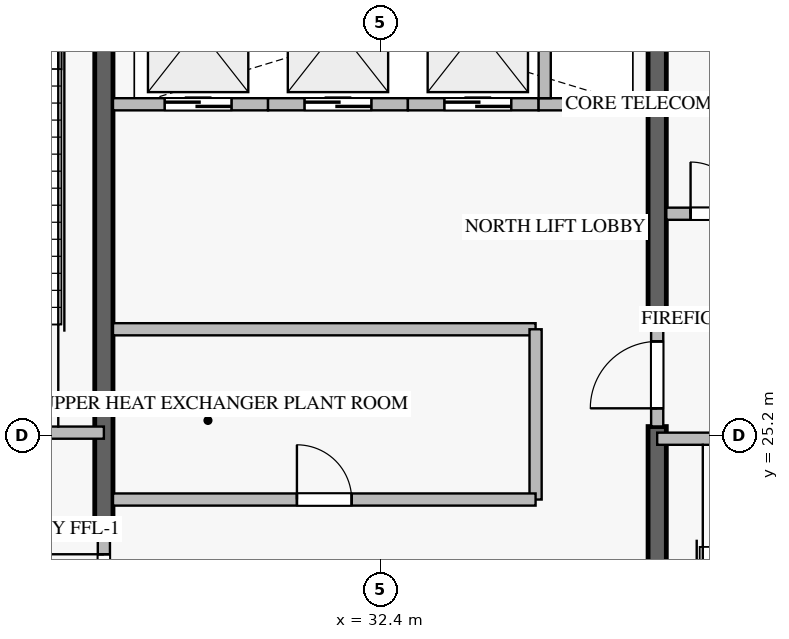
"""IFC4 building model, lengths in metres.
Left out: names, types, materials, properties, quantities, classifications, styles, units other than length and angle.
Written with IfcOpenShell. Run it as: python <this file> out.ifc"""

import sys

from ifc_helpers import new_model, si_unit, direction, frame, frame_2d, origin, place, context, subcontext, project, spatial, rectangle, extrude, source, transform, mapped, element, fill, save


model = new_model("IFC4")
c1 = context("Model", 3, precision=1e-05, world=origin(), true_north=direction((0.0, 1.0)))
c2 = subcontext(c1, "Body", "Model", "MODEL_VIEW")
j1 = project(units=[si_unit("LENGTHUNIT", "METRE"), si_unit("PLANEANGLEUNIT", "RADIAN")], contexts=[c1])
p1 = place(None, origin())
s1 = spatial("IfcSite", under=j1, at=p1, CompositionType="ELEMENT")
p2 = place(p1, origin())
s2 = spatial("IfcBuilding", under=s1, at=p2, CompositionType="ELEMENT")
p3 = place(p2, frame((0.0, 0.0, 287.45)))
s3 = spatial("IfcBuildingStorey", under=s2, at=p3, CompositionType="ELEMENT", Elevation=287.45)
p4 = place(p3, frame((27.85, 23.55, -0.44), z_axis=(0.0, 0.0, 1.0), x_axis=(0.0, 1.0, 0.0)))
e1 = element("IfcWall", 1, at=p4, inside=s3, PredefinedType="SHEAR", context=c2, shape_type="SweptSolid", body=[
    extrude(rectangle(XDim=9.875, YDim=0.3, at=frame_2d((4.938, 0.0))), origin(), (0.0, 0.0, 1.0), 6.178),
])
p5 = place(p3, frame((36.95, 16.975, -0.44), z_axis=(0.0, 0.0, 1.0), x_axis=(0.0, 1.0, 0.0)))
e2 = element("IfcWall", 2, at=p5, inside=s3, PredefinedType="SHEAR", context=c2, shape_type="SweptSolid", body=[
    extrude(rectangle(XDim=8.375, YDim=0.3, at=frame_2d((4.188, 0.0))), origin(), (0.0, 0.0, 1.0), 6.178),
])
p6 = place(p3, frame((36.95, 27.05, -0.44), z_axis=(0.0, 0.0, 1.0), x_axis=(0.0, 1.0, 0.0)))
e3 = element("IfcWall", 3, at=p6, inside=s3, PredefinedType="SHEAR", context=c2, shape_type="SweptSolid", body=[
    extrude(rectangle(XDim=6.375, YDim=0.3, at=frame_2d((3.188, 0.0))), origin(), (0.0, 0.0, 1.0), 6.178),
])
p7 = place(p3, frame((23.4, 25.25, 0.0), z_axis=(0.0, 0.0, 1.0), x_axis=(1.0, 0.0, 0.0)))
e4 = element("IfcWall", 4, at=p7, inside=s3, PredefinedType="STANDARD", context=c2, shape_type="SweptSolid", body=[
    extrude(rectangle(XDim=4.45, YDim=0.2, at=frame_2d((2.225, 0.0))), origin(), (0.0, 0.0, 1.0), 5.74),
])
p8 = place(p7, frame((1.65, 0.0, 0.0)))
e5 = element("IfcOpeningElement", 5, at=p8, cuts=e4, PredefinedType="OPENING", context=c2, shape_type="SweptSolid", body=[
    extrude(rectangle(XDim=1.1, YDim=2.15, at=frame_2d((0.55, 1.075))), frame((0.0, 0.11, 0.0), z_axis=(0.0, -1.0, 0.0), x_axis=(1.0, 0.0, 0.0)), (0.0, 0.0, 1.0), 0.22),
])
p9 = place(p3, frame((36.95, 25.15, 0.0), z_axis=(0.0, 0.0, 1.0), x_axis=(1.0, 0.0, 0.0)))
e6 = element("IfcWall", 6, at=p9, inside=s3, PredefinedType="STANDARD", context=c2, shape_type="SweptSolid", body=[
    extrude(rectangle(XDim=4.45, YDim=0.2, at=frame_2d((2.225, 0.0))), origin(), (0.0, 0.0, 1.0), 5.74),
])
p10 = place(p9, frame((1.65, 0.0, 0.0)))
e7 = element("IfcOpeningElement", 7, at=p10, cuts=e6, PredefinedType="OPENING", context=c2, shape_type="SweptSolid", body=[
    extrude(rectangle(XDim=1.1, YDim=2.15, at=frame_2d((0.55, 1.075))), frame((0.0, 0.11, 0.0), z_axis=(0.0, -1.0, 0.0), x_axis=(1.0, 0.0, 0.0)), (0.0, 0.0, 1.0), 0.22),
])
p11 = place(p3, frame((28.0, 30.65, 0.0), z_axis=(0.0, 0.0, 1.0), x_axis=(1.0, 0.0, 0.0)))
e8 = element("IfcWall", 8, at=p11, inside=s3, PredefinedType="STANDARD", context=c2, shape_type="SweptSolid", body=[
    extrude(rectangle(XDim=2.55, YDim=0.2, at=frame_2d((1.275, 0.0))), origin(), (0.0, 0.0, 1.0), 5.74),
])
p12 = place(p11, frame((0.85, 0.0, 0.0)))
e9 = element("IfcOpeningElement", 9, at=p12, cuts=e8, PredefinedType="OPENING", context=c2, shape_type="SweptSolid", body=[
    extrude(rectangle(XDim=1.1, YDim=2.2, at=frame_2d((0.55, 1.1))), frame((0.0, 0.11, 0.0), z_axis=(0.0, -1.0, 0.0), x_axis=(1.0, 0.0, 0.0)), (0.0, 0.0, 1.0), 0.22),
])
p13 = place(p3, frame((30.55, 30.65, 0.0), z_axis=(0.0, 0.0, 1.0), x_axis=(1.0, 0.0, 0.0)))
e10 = element("IfcWall", 10, at=p13, inside=s3, PredefinedType="STANDARD", context=c2, shape_type="SweptSolid", body=[
    extrude(rectangle(XDim=2.3, YDim=0.2, at=frame_2d((1.15, 0.0))), origin(), (0.0, 0.0, 1.0), 5.74),
])
p14 = place(p13, frame((0.6, 0.0, 0.0)))
e11 = element("IfcOpeningElement", 11, at=p14, cuts=e10, PredefinedType="OPENING", context=c2, shape_type="SweptSolid", body=[
    extrude(rectangle(XDim=1.1, YDim=2.2, at=frame_2d((0.55, 1.1))), frame((0.0, 0.11, 0.0), z_axis=(0.0, -1.0, 0.0), x_axis=(1.0, 0.0, 0.0)), (0.0, 0.0, 1.0), 0.22),
])
p15 = place(p3, frame((32.85, 30.65, 0.0), z_axis=(0.0, 0.0, 1.0), x_axis=(1.0, 0.0, 0.0)))
e12 = element("IfcWall", 12, at=p15, inside=s3, PredefinedType="STANDARD", context=c2, shape_type="SweptSolid", body=[
    extrude(rectangle(XDim=2.15, YDim=0.2, at=frame_2d((1.075, 0.0))), origin(), (0.0, 0.0, 1.0), 5.74),
])
p16 = place(p15, frame((0.6, 0.0, 0.0)))
e13 = element("IfcOpeningElement", 13, at=p16, cuts=e12, PredefinedType="OPENING", context=c2, shape_type="SweptSolid", body=[
    extrude(rectangle(XDim=1.1, YDim=2.2, at=frame_2d((0.55, 1.1))), frame((0.0, 0.11, 0.0), z_axis=(0.0, -1.0, 0.0), x_axis=(1.0, 0.0, 0.0)), (0.0, 0.0, 1.0), 0.22),
])
p17 = place(p3, frame((35.0, 30.65, 0.0), z_axis=(0.0, 0.0, 1.0), x_axis=(1.0, 0.0, 0.0)))
e14 = element("IfcWall", 14, at=p17, inside=s3, PredefinedType="STANDARD", context=c2, shape_type="SweptSolid", body=[
    extrude(rectangle(XDim=1.8, YDim=0.2, at=frame_2d((0.9, 0.0))), origin(), (0.0, 0.0, 1.0), 5.74),
])
p18 = place(p3, frame((35.1, 30.75, 0.0), z_axis=(0.0, 0.0, 1.0), x_axis=(0.0, 1.0, 0.0)))
e15 = element("IfcWall", 15, at=p18, inside=s3, PredefinedType="STANDARD", context=c2, shape_type="SweptSolid", body=[
    extrude(rectangle(XDim=2.675, YDim=0.2, at=frame_2d((1.337, 0.0))), origin(), (0.0, 0.0, 1.0), 5.74),
])
p19 = place(p3, frame((37.1, 28.85, 0.0), z_axis=(0.0, 0.0, 1.0), x_axis=(1.0, 0.0, 0.0)))
e16 = element("IfcWall", 16, at=p19, inside=s3, PredefinedType="STANDARD", context=c2, shape_type="SweptSolid", body=[
    extrude(rectangle(XDim=1.648, YDim=0.2, at=frame_2d((0.824, 0.0))), origin(), (0.0, 0.0, 1.0), 5.74),
])
p20 = place(p19, frame((0.399, 0.0, 0.0)))
e17 = element("IfcOpeningElement", 17, at=p20, cuts=e16, PredefinedType="OPENING", context=c2, shape_type="SweptSolid", body=[
    extrude(rectangle(XDim=0.85, YDim=2.1, at=frame_2d((0.425, 1.05))), frame((0.0, 0.11, 0.0), z_axis=(0.0, -1.0, 0.0), x_axis=(1.0, 0.0, 0.0)), (0.0, 0.0, 1.0), 0.22),
])
p21 = place(p3, frame((27.85, 21.852, 0.0), z_axis=(0.0, 0.0, 1.0), x_axis=(0.0, 1.0, 0.0)))
e18 = element("IfcWall", 18, at=p21, inside=s3, PredefinedType="STANDARD", context=c2, shape_type="SweptSolid", body=[
    extrude(rectangle(XDim=1.696, YDim=0.2, at=frame_2d((0.848, 0.0))), origin(), (0.0, 0.0, 1.0), 5.74),
])
p22 = place(p21, frame((0.298, 0.0, 0.0)))
e19 = element("IfcOpeningElement", 19, at=p22, cuts=e18, PredefinedType="OPENING", context=c2, shape_type="SweptSolid", body=[
    extrude(rectangle(XDim=1.1, YDim=2.15, at=frame_2d((0.55, 1.075))), frame((0.0, 0.11, 0.0), z_axis=(0.0, -1.0, 0.0), x_axis=(1.0, 0.0, 0.0)), (0.0, 0.0, 1.0), 0.22),
])
p23 = place(p3, frame((36.95, 25.352, 0.0), z_axis=(0.0, 0.0, 1.0), x_axis=(0.0, 1.0, 0.0)))
e20 = element("IfcWall", 20, at=p23, inside=s3, PredefinedType="STANDARD", context=c2, shape_type="SweptSolid", body=[
    extrude(rectangle(XDim=1.696, YDim=0.2, at=frame_2d((0.848, 0.0))), origin(), (0.0, 0.0, 1.0), 5.74),
])
p24 = place(p23, frame((0.298, 0.0, 0.0)))
e21 = element("IfcOpeningElement", 21, at=p24, cuts=e20, PredefinedType="OPENING", context=c2, shape_type="SweptSolid", body=[
    extrude(rectangle(XDim=1.1, YDim=2.15, at=frame_2d((0.55, 1.075))), frame((0.0, 0.11, 0.0), z_axis=(0.0, -1.0, 0.0), x_axis=(1.0, 0.0, 0.0)), (0.0, 0.0, 1.0), 0.22),
])
p25 = place(p3, frame((28.0, 26.95, 0.0), z_axis=(0.0, 0.0, 1.0), x_axis=(1.0, 0.0, 0.0)))
e22 = element("IfcWall", 22, at=p25, inside=s3, PredefinedType="STANDARD", context=c2, shape_type="SweptSolid", body=[
    extrude(rectangle(XDim=6.95, YDim=0.2, at=frame_2d((3.475, 0.0))), origin(), (0.0, 0.0, 1.0), 5.74),
])
p26 = place(p3, frame((34.95, 24.15, 0.0), z_axis=(0.0, 0.0, 1.0), x_axis=(0.0, 1.0, 0.0)))
e23 = element("IfcWall", 23, at=p26, inside=s3, PredefinedType="STANDARD", context=c2, shape_type="SweptSolid", body=[
    extrude(rectangle(XDim=2.8, YDim=0.2, at=frame_2d((1.4, 0.0))), origin(), (0.0, 0.0, 1.0), 5.74),
])
p27 = place(p3, frame((28.0, 24.15, 0.0), z_axis=(0.0, 0.0, 1.0), x_axis=(1.0, 0.0, 0.0)))
e24 = element("IfcWall", 24, at=p27, inside=s3, PredefinedType="STANDARD", context=c2, shape_type="SweptSolid", body=[
    extrude(rectangle(XDim=6.95, YDim=0.2, at=frame_2d((3.475, 0.0))), origin(), (0.0, 0.0, 1.0), 5.74),
])
p28 = place(p27, frame((3.025, 0.0, 0.0)))
e25 = element("IfcOpeningElement", 25, at=p28, cuts=e24, PredefinedType="OPENING", context=c2, shape_type="SweptSolid", body=[
    extrude(rectangle(XDim=0.9, YDim=2.1, at=frame_2d((0.45, 1.05))), frame((0.0, 0.11, 0.0), z_axis=(0.0, -1.0, 0.0), x_axis=(1.0, 0.0, 0.0)), (0.0, 0.0, 1.0), 0.22),
])
m1 = source(origin(), c2, "Body", "SweptSolid", [
    extrude(rectangle(XDim=1.1, YDim=2.2, at=frame_2d((0.55, 1.1))), frame((0.0, 0.025, 0.0), z_axis=(0.0, -1.0, 0.0), x_axis=(1.0, 0.0, 0.0)), (0.0, 0.0, 1.0), 0.05),
])
p29 = place(p12, origin())
e26 = element("IfcDoor", 26, at=p29, inside=s3, OperationType="DOUBLE_DOOR_SLIDING", PredefinedType="DOOR", context=c2, shape_type="MappedRepresentation", body=[
    mapped(m1, transform((0.0, 0.0, 0.0), scale=1.0)),
])
fill(e9, e26)
p30 = place(p14, origin())
e27 = element("IfcDoor", 27, at=p30, inside=s3, OperationType="DOUBLE_DOOR_SLIDING", PredefinedType="DOOR", context=c2, shape_type="MappedRepresentation", body=[
    mapped(m1, transform((0.0, 0.0, 0.0), scale=1.0)),
])
fill(e11, e27)
p31 = place(p16, origin())
e28 = element("IfcDoor", 28, at=p31, inside=s3, OperationType="DOUBLE_DOOR_SLIDING", PredefinedType="DOOR", context=c2, shape_type="MappedRepresentation", body=[
    mapped(m1, transform((0.0, 0.0, 0.0), scale=1.0)),
])
fill(e13, e28)
m2 = source(origin(), c2, "Body", "SweptSolid", [
    extrude(rectangle(XDim=0.85, YDim=2.1, at=frame_2d((0.425, 1.05))), frame((0.0, 0.025, 0.0), z_axis=(0.0, -1.0, 0.0), x_axis=(1.0, 0.0, 0.0)), (0.0, 0.0, 1.0), 0.05),
])
p32 = place(p20, origin())
e29 = element("IfcDoor", 29, at=p32, inside=s3, OperationType="SINGLE_SWING_LEFT", PredefinedType="DOOR", context=c2, shape_type="MappedRepresentation", body=[
    mapped(m2, transform((0.0, 0.0, 0.0), scale=1.0)),
])
fill(e17, e29)
m3 = source(origin(), c2, "Body", "SweptSolid", [
    extrude(rectangle(XDim=1.1, YDim=2.15, at=frame_2d((0.55, 1.075))), frame((0.0, 0.025, 0.0), z_axis=(0.0, -1.0, 0.0), x_axis=(1.0, 0.0, 0.0)), (0.0, 0.0, 1.0), 0.05),
])
p33 = place(p22, origin())
e30 = element("IfcDoor", 30, at=p33, inside=s3, OperationType="SINGLE_SWING_RIGHT", PredefinedType="DOOR", context=c2, shape_type="MappedRepresentation", body=[
    mapped(m3, transform((0.0, 0.0, 0.0), scale=1.0)),
])
fill(e19, e30)
p34 = place(p24, origin())
e31 = element("IfcDoor", 31, at=p34, inside=s3, OperationType="SINGLE_SWING_LEFT", PredefinedType="DOOR", context=c2, shape_type="MappedRepresentation", body=[
    mapped(m3, transform((0.0, 0.0, 0.0), scale=1.0)),
])
fill(e21, e31)
m4 = source(origin(), c2, "Body", "SweptSolid", [
    extrude(rectangle(XDim=0.9, YDim=2.1, at=frame_2d((0.45, 1.05))), frame((0.0, 0.025, 0.0), z_axis=(0.0, -1.0, 0.0), x_axis=(1.0, 0.0, 0.0)), (0.0, 0.0, 1.0), 0.05),
])
p35 = place(p28, origin())
e32 = element("IfcDoor", 32, at=p35, inside=s3, OperationType="SINGLE_SWING_LEFT", PredefinedType="DOOR", context=c2, shape_type="MappedRepresentation", body=[
    mapped(m4, transform((0.0, 0.0, 0.0), scale=1.0)),
])
fill(e25, e32)
save(model, sys.argv[1])
